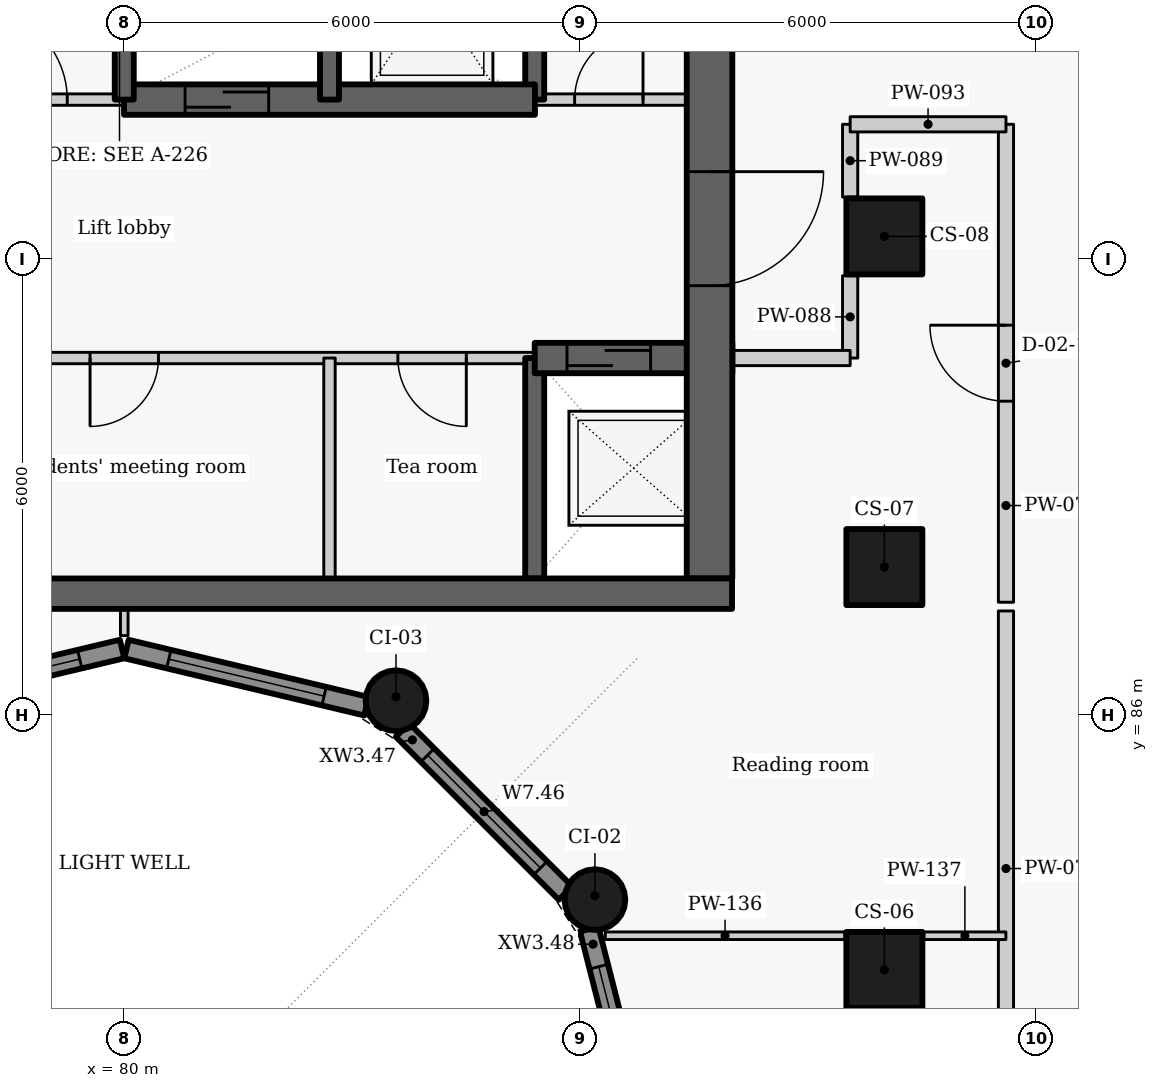
"""IFC4 building model, lengths in metres.
Left out: names, types, materials, properties, quantities, classifications, styles, units other than length and angle.
Written with IfcOpenShell. Run it as: python <this file> out.ifc"""

import sys

from ifc_helpers import new_model, si_unit, direction, frame, frame_2d, origin, origin_2d, place, context, subcontext, project, spatial, rectangle, circle, extrude, element, fill, save


model = new_model("IFC4")
c1 = context("Model", 3, precision=1e-05, world=origin(), true_north=direction((0.0, 1.0)))
c2 = subcontext(c1, "Body", "Model", "MODEL_VIEW")
j1 = project(units=[si_unit("LENGTHUNIT", "METRE"), si_unit("PLANEANGLEUNIT", "RADIAN")], contexts=[c1])
p1 = place(None, origin())
s1 = spatial("IfcSite", under=j1, at=p1, CompositionType="ELEMENT")
p2 = place(p1, origin())
s2 = spatial("IfcBuilding", under=s1, at=p2, CompositionType="ELEMENT")
p3 = place(p2, frame((0.0, 0.0, 140.4)))
s3 = spatial("IfcBuildingStorey", under=s2, at=p3, CompositionType="ELEMENT", Elevation=140.4)
for number, where, z_axis, x_axis in (
    (1, (90.0, 82.65, 0.0), (0.0, 0.0, 1.0), (0.0, 1.0, 0.0)),
    (2, (90.0, 87.95, 0.0), (0.0, 0.0, 1.0), (0.0, 1.0, 0.0)),
    (3, (90.0, 92.3, 0.0), (0.0, 0.0, 1.0), (0.0, 1.0, 0.0)),
):
    element("IfcColumn", number, at=place(p3, frame(where, z_axis=z_axis, x_axis=x_axis)), inside=s3, PredefinedType="COLUMN", context=c2, shape_type="SweptSolid", body=[
        extrude(rectangle(XDim=1.0, YDim=1.0, at=origin_2d()), origin(), (0.0, 0.0, 1.0), 3.3),
    ])
for number, where, z_axis, x_axis in (
    (4, (86.192, 83.575, 0.0), (0.0, 0.0, 1.0), (-0.5, 0.866, 0.0)),
    (5, (83.575, 86.192, 0.0), (0.0, 0.0, 1.0), (-0.866, 0.5, 0.0)),
):
    element("IfcColumn", number, at=place(p3, frame(where, z_axis=z_axis, x_axis=x_axis)), inside=s3, PredefinedType="COLUMN", context=c2, shape_type="SweptSolid", body=[
        extrude(circle(Radius=0.4, at=origin_2d()), origin(), (0.0, 0.0, 1.0), 3.3),
    ])
p4 = place(p3, frame((76.814, 86.119, 0.0), z_axis=(0.0, 0.0, 1.0), x_axis=(0.972773113459, 0.231759508395, 0.0)))
e6 = element("IfcWall", 6, at=p4, inside=s3, PredefinedType="SOLIDWALL", context=c2, shape_type="SweptSolid", body=[
    extrude(rectangle(XDim=3.246, YDim=0.25, at=frame_2d((1.623, 0.0))), origin(), (0.0, 0.0, 1.0), 2.425),
])
p5 = place(p4, frame((0.573, 0.0, 0.9)))
e7 = element("IfcOpeningElement", 7, at=p5, cuts=e6, PredefinedType="OPENING", context=c2, shape_type="SweptSolid", body=[
    extrude(rectangle(XDim=2.1, YDim=1.1, at=frame_2d((1.05, 0.55))), frame((0.0, 0.135, 0.0), z_axis=(0.0, -1.0, 0.0), x_axis=(1.0, 0.0, 0.0)), (0.0, 0.0, 1.0), 0.27),
])
p6 = place(p3, frame((80.029, 86.872, 0.0), z_axis=(0.0, 0.0, 1.0), x_axis=(0.972773113459, -0.231759508395, 0.0)))
e8 = element("IfcWall", 8, at=p6, inside=s3, PredefinedType="SOLIDWALL", context=c2, shape_type="SweptSolid", body=[
    extrude(rectangle(XDim=3.246, YDim=0.25, at=frame_2d((1.623, 0.0))), origin(), (0.0, 0.0, 1.0), 2.425),
])
p7 = place(p6, frame((0.573, 0.0, 0.9)))
e9 = element("IfcOpeningElement", 9, at=p7, cuts=e8, PredefinedType="OPENING", context=c2, shape_type="SweptSolid", body=[
    extrude(rectangle(XDim=2.1, YDim=1.1, at=frame_2d((1.05, 0.55))), frame((0.0, 0.135, 0.0), z_axis=(0.0, -1.0, 0.0), x_axis=(1.0, 0.0, 0.0)), (0.0, 0.0, 1.0), 0.27),
])
p8 = place(p3, frame((83.661, 85.806, 0.0), z_axis=(0.0, 0.0, 1.0), x_axis=(0.707106781187, -0.707106781187, 0.0)))
e10 = element("IfcWall", 10, at=p8, inside=s3, PredefinedType="SOLIDWALL", context=c2, shape_type="SweptSolid", body=[
    extrude(rectangle(XDim=3.033, YDim=0.25, at=frame_2d((1.517, 0.0))), origin(), (0.0, 0.0, 1.0), 2.425),
])
p9 = place(p8, frame((0.467, 0.0, 0.9)))
e11 = element("IfcOpeningElement", 11, at=p9, cuts=e10, PredefinedType="OPENING", context=c2, shape_type="SweptSolid", body=[
    extrude(rectangle(XDim=2.1, YDim=1.1, at=frame_2d((1.05, 0.55))), frame((0.0, 0.135, 0.0), z_axis=(0.0, -1.0, 0.0), x_axis=(1.0, 0.0, 0.0)), (0.0, 0.0, 1.0), 0.27),
])
p10 = place(p3, frame((86.117, 83.187, 0.0), z_axis=(0.0, 0.0, 1.0), x_axis=(0.247055971283, -0.969001211069, 0.0)))
e12 = element("IfcWall", 12, at=p10, inside=s3, PredefinedType="SOLIDWALL", context=c2, shape_type="SweptSolid", body=[
    extrude(rectangle(XDim=3.01, YDim=0.25, at=frame_2d((1.505, 0.0))), origin(), (0.0, 0.0, 1.0), 2.425),
])
p11 = place(p10, frame((0.51, 0.0, 0.9)))
e13 = element("IfcOpeningElement", 13, at=p11, cuts=e12, PredefinedType="OPENING", context=c2, shape_type="SweptSolid", body=[
    extrude(rectangle(XDim=2.1, YDim=1.1, at=frame_2d((1.05, 0.55))), frame((0.0, 0.135, 0.0), z_axis=(0.0, -1.0, 0.0), x_axis=(1.0, 0.0, 0.0)), (0.0, 0.0, 1.0), 0.27),
])
p12 = place(p3, frame((85.4, 90.7, 0.0), z_axis=(0.0, 0.0, 1.0), x_axis=(-1.0, 0.0, 0.0)))
e14 = element("IfcWall", 14, at=p12, inside=s3, PredefinedType="PARTITIONING", context=c2, shape_type="SweptSolid", body=[
    extrude(rectangle(XDim=13.4, YDim=0.15, at=frame_2d((6.7, 0.0))), origin(), (0.0, 0.0, 1.0), 3.025),
])
p13 = place(p12, frame((11.325, 0.0, 0.0)))
e15 = element("IfcOpeningElement", 15, at=p13, cuts=e14, PredefinedType="OPENING", context=c2, shape_type="SweptSolid", body=[
    extrude(rectangle(XDim=0.9, YDim=2.1, at=frame_2d((0.45, 1.05))), frame((0.0, 0.085, 0.0), z_axis=(0.0, -1.0, 0.0), x_axis=(1.0, 0.0, 0.0)), (0.0, 0.0, 1.0), 0.17),
])
p14 = place(p12, frame((9.0, 0.0, 0.0)))
e16 = element("IfcOpeningElement", 16, at=p14, cuts=e14, PredefinedType="OPENING", context=c2, shape_type="SweptSolid", body=[
    extrude(rectangle(XDim=0.9, YDim=2.1, at=frame_2d((0.45, 1.05))), frame((0.0, 0.085, 0.0), z_axis=(0.0, -1.0, 0.0), x_axis=(1.0, 0.0, 0.0)), (0.0, 0.0, 1.0), 0.17),
])
p15 = place(p12, frame((4.95, 0.0, 0.0)))
e17 = element("IfcOpeningElement", 17, at=p15, cuts=e14, PredefinedType="OPENING", context=c2, shape_type="SweptSolid", body=[
    extrude(rectangle(XDim=0.9, YDim=2.1, at=frame_2d((0.45, 1.05))), frame((0.0, 0.085, 0.0), z_axis=(0.0, -1.0, 0.0), x_axis=(1.0, 0.0, 0.0)), (0.0, 0.0, 1.0), 0.17),
])
p16 = place(p12, frame((0.9, 0.0, 0.0)))
e18 = element("IfcOpeningElement", 18, at=p16, cuts=e14, PredefinedType="OPENING", context=c2, shape_type="SweptSolid", body=[
    extrude(rectangle(XDim=0.9, YDim=2.1, at=frame_2d((0.45, 1.05))), frame((0.0, 0.085, 0.0), z_axis=(0.0, -1.0, 0.0), x_axis=(1.0, 0.0, 0.0)), (0.0, 0.0, 1.0), 0.17),
])
p17 = place(p3, frame((85.4, 87.8, -0.275), z_axis=(0.0, 0.0, 1.0), x_axis=(0.0, 1.0, 0.0)))
e19 = element("IfcWall", 19, at=p17, inside=s3, PredefinedType="SHEAR", context=c2, shape_type="SweptSolid", body=[
    extrude(rectangle(XDim=2.9, YDim=0.25, at=frame_2d((1.45, 0.0))), origin(), (0.0, 0.0, 1.0), 3.3),
])
p18 = place(p3, frame((85.4, 94.1, -0.275), z_axis=(0.0, 0.0, 1.0), x_axis=(0.0, 1.0, 0.0)))
e20 = element("IfcWall", 20, at=p18, inside=s3, PredefinedType="SHEAR", context=c2, shape_type="SweptSolid", body=[
    extrude(rectangle(XDim=2.8, YDim=0.25, at=frame_2d((1.4, 0.0))), origin(), (0.0, 0.0, 1.0), 3.3),
])
p19 = place(p3, frame((85.4, 90.7, -0.275), z_axis=(0.0, 0.0, 1.0), x_axis=(1.0, 0.0, 0.0)))
e21 = element("IfcWall", 21, at=p19, inside=s3, PredefinedType="SHEAR", context=c2, shape_type="SweptSolid", body=[
    extrude(rectangle(XDim=2.6, YDim=0.4, at=frame_2d((1.3, 0.0))), origin(), (0.0, 0.0, 1.0), 3.3),
])
p20 = place(p19, frame((0.425, 0.0, 0.275)))
e22 = element("IfcOpeningElement", 22, at=p20, cuts=e21, PredefinedType="OPENING", context=c2, shape_type="SweptSolid", body=[
    extrude(rectangle(XDim=1.1, YDim=2.1, at=frame_2d((0.55, 1.05))), frame((0.0, 0.21, 0.0), z_axis=(0.0, -1.0, 0.0), x_axis=(1.0, 0.0, 0.0)), (0.0, 0.0, 1.0), 0.42),
])
p21 = place(p3, frame((87.7, 103.4, -0.275), z_axis=(0.0, 0.0, 1.0), x_axis=(0.0, -1.0, 0.0)))
e23 = element("IfcWall", 23, at=p21, inside=s3, PredefinedType="SHEAR", context=c2, shape_type="SweptSolid", body=[
    extrude(rectangle(XDim=15.6, YDim=0.6, at=frame_2d((7.8, 0.0))), origin(), (0.0, 0.0, 1.0), 3.3),
])
p22 = place(p21, frame((10.248, 0.0, 0.275)))
e24 = element("IfcOpeningElement", 24, at=p22, cuts=e23, PredefinedType="OPENING", context=c2, shape_type="SweptSolid", body=[
    extrude(rectangle(XDim=1.5, YDim=2.1, at=frame_2d((0.75, 1.05))), frame((0.0, 0.31, 0.0), z_axis=(0.0, -1.0, 0.0), x_axis=(1.0, 0.0, 0.0)), (0.0, 0.0, 1.0), 0.62),
])
p23 = place(p3, frame((82.7, 87.8, 0.0), z_axis=(0.0, 0.0, 1.0), x_axis=(0.0, 1.0, 0.0)))
e25 = element("IfcWall", 25, at=p23, inside=s3, PredefinedType="PARTITIONING", context=c2, shape_type="SweptSolid", body=[
    extrude(rectangle(XDim=2.9, YDim=0.15, at=frame_2d((1.45, 0.0))), origin(), (0.0, 0.0, 1.0), 3.025),
])
p24 = place(p3, frame((77.297, 94.1, 0.0), z_axis=(0.0, 0.0, 1.0), x_axis=(1.0, 0.0, 0.0)))
e26 = element("IfcWall", 26, at=p24, inside=s3, PredefinedType="PARTITIONING", context=c2, shape_type="SweptSolid", body=[
    extrude(rectangle(XDim=2.706, YDim=0.15, at=frame_2d((1.353, 0.0))), origin(), (0.0, 0.0, 1.0), 3.025),
])
p25 = place(p24, frame((0.753, 0.0, 0.0)))
e27 = element("IfcOpeningElement", 27, at=p25, cuts=e26, PredefinedType="OPENING", context=c2, shape_type="SweptSolid", body=[
    extrude(rectangle(XDim=1.2, YDim=2.1, at=frame_2d((0.6, 1.05))), frame((0.0, 0.085, 0.0), z_axis=(0.0, -1.0, 0.0), x_axis=(1.0, 0.0, 0.0)), (0.0, 0.0, 1.0), 0.17),
])
p26 = place(p3, frame((85.397, 94.1, 0.0), z_axis=(0.0, 0.0, 1.0), x_axis=(1.0, 0.0, 0.0)))
e28 = element("IfcWall", 28, at=p26, inside=s3, PredefinedType="PARTITIONING", context=c2, shape_type="SweptSolid", body=[
    extrude(rectangle(XDim=2.603, YDim=0.15, at=frame_2d((1.302, 0.0))), origin(), (0.0, 0.0, 1.0), 3.025),
])
p27 = place(p26, frame((0.528, 0.0, 0.0)))
e29 = element("IfcOpeningElement", 29, at=p27, cuts=e28, PredefinedType="OPENING", context=c2, shape_type="SweptSolid", body=[
    extrude(rectangle(XDim=0.9, YDim=2.1, at=frame_2d((0.45, 1.05))), frame((0.0, 0.085, 0.0), z_axis=(0.0, -1.0, 0.0), x_axis=(1.0, 0.0, 0.0)), (0.0, 0.0, 1.0), 0.17),
])
p28 = place(p3, frame((79.997, 94.1, -0.275), z_axis=(0.0, 0.0, 1.0), x_axis=(1.0, 0.0, 0.0)))
e30 = element("IfcWall", 30, at=p28, inside=s3, PredefinedType="SHEAR", context=c2, shape_type="SweptSolid", body=[
    extrude(rectangle(XDim=5.406, YDim=0.4, at=frame_2d((2.703, 0.0))), origin(), (0.0, 0.0, 1.0), 3.3),
])
p29 = place(p28, frame((0.803, 0.0, 0.275)))
e31 = element("IfcOpeningElement", 31, at=p29, cuts=e30, PredefinedType="OPENING", context=c2, shape_type="SweptSolid", body=[
    extrude(rectangle(XDim=1.1, YDim=2.1, at=frame_2d((0.55, 1.05))), frame((0.0, 0.21, 0.0), z_axis=(0.0, -1.0, 0.0), x_axis=(1.0, 0.0, 0.0)), (0.0, 0.0, 1.0), 0.42),
])
for number, where, z_axis, x_axis in (
    (32, (80.0, 94.1, -0.275), (0.0, 0.0, 1.0), (0.0, 1.0, 0.0)),
    (33, (82.7, 94.1, -0.275), (0.0, 0.0, 1.0), (0.0, 1.0, 0.0)),
):
    element("IfcWall", number, at=place(p3, frame(where, z_axis=z_axis, x_axis=x_axis)), inside=s3, PredefinedType="SHEAR", context=c2, shape_type="SweptSolid", body=[
        extrude(rectangle(XDim=2.8, YDim=0.25, at=frame_2d((1.4, 0.0))), origin(), (0.0, 0.0, 1.0), 3.3),
    ])
p30 = place(p3, frame((91.6, 76.887, 0.0), z_axis=(0.0, 0.0, 1.0), x_axis=(0.0, 1.0, 0.0)))
e34 = element("IfcWall", 34, at=p30, inside=s3, PredefinedType="PARTITIONING", context=c2, shape_type="SweptSolid", body=[
    extrude(rectangle(XDim=10.486, YDim=0.2, at=frame_2d((5.243, 0.0))), origin(), (0.0, 0.0, 1.0), 3.025),
])
p31 = place(p30, frame((2.608, 0.0, 0.0)))
e35 = element("IfcOpeningElement", 35, at=p31, cuts=e34, PredefinedType="OPENING", context=c2, shape_type="SweptSolid", body=[
    extrude(rectangle(XDim=1.0, YDim=2.1, at=frame_2d((0.5, 1.05))), frame((0.0, 0.11, 0.0), z_axis=(0.0, -1.0, 0.0), x_axis=(1.0, 0.0, 0.0)), (0.0, 0.0, 1.0), 0.22),
])
p32 = place(p3, frame((91.6, 87.487, 0.0), z_axis=(0.0, 0.0, 1.0), x_axis=(0.0, 1.0, 0.0)))
e36 = element("IfcWall", 36, at=p32, inside=s3, PredefinedType="PARTITIONING", context=c2, shape_type="SweptSolid", body=[
    extrude(rectangle(XDim=6.288, YDim=0.2, at=frame_2d((3.144, 0.0))), origin(), (0.0, 0.0, 1.0), 3.025),
])
p33 = place(p32, frame((2.645, 0.0, 0.0)))
e37 = element("IfcOpeningElement", 37, at=p33, cuts=e36, PredefinedType="OPENING", context=c2, shape_type="SweptSolid", body=[
    extrude(rectangle(XDim=1.0, YDim=2.1, at=frame_2d((0.5, 1.05))), frame((0.0, 0.11, 0.0), z_axis=(0.0, -1.0, 0.0), x_axis=(1.0, 0.0, 0.0)), (0.0, 0.0, 1.0), 0.22),
])
p34 = place(p3, frame((89.55, 90.7, 0.0), z_axis=(0.0, 0.0, 1.0), x_axis=(0.0, 1.0, 0.0)))
e38 = element("IfcWall", 38, at=p34, inside=s3, PredefinedType="PARTITIONING", context=c2, shape_type="SweptSolid", body=[
    extrude(rectangle(XDim=1.083, YDim=0.2, at=frame_2d((0.542, 0.0))), origin(), (0.0, 0.0, 1.0), 3.025),
])
p35 = place(p3, frame((89.55, 92.817, 0.0), z_axis=(0.0, 0.0, 1.0), x_axis=(0.0, 1.0, 0.0)))
e39 = element("IfcWall", 39, at=p35, inside=s3, PredefinedType="PARTITIONING", context=c2, shape_type="SweptSolid", body=[
    extrude(rectangle(XDim=0.958, YDim=0.2, at=frame_2d((0.479, 0.0))), origin(), (0.0, 0.0, 1.0), 3.025),
])
p36 = place(p3, frame((89.55, 93.775, 0.0), z_axis=(0.0, 0.0, 1.0), x_axis=(1.0, 0.0, 0.0)))
e40 = element("IfcWall", 40, at=p36, inside=s3, PredefinedType="PARTITIONING", context=c2, shape_type="SweptSolid", body=[
    extrude(rectangle(XDim=2.05, YDim=0.2, at=frame_2d((1.025, 0.0))), origin(), (0.0, 0.0, 1.0), 2.505),
])
p37 = place(p3, frame((88.0, 90.7, 0.0), z_axis=(0.0, 0.0, 1.0), x_axis=(1.0, 0.0, 0.0)))
e41 = element("IfcWall", 41, at=p37, inside=s3, PredefinedType="PARTITIONING", context=c2, shape_type="SweptSolid", body=[
    extrude(rectangle(XDim=1.55, YDim=0.2, at=frame_2d((0.775, 0.0))), origin(), (0.0, 0.0, 1.0), 3.025),
])
p38 = place(p3, frame((80.0, 87.048, 0.0), z_axis=(0.0, 0.0, 1.0), x_axis=(0.0, 1.0, 0.0)))
e42 = element("IfcWall", 42, at=p38, inside=s3, PredefinedType="PARTITIONING", context=c2, shape_type="SweptSolid", body=[
    extrude(rectangle(XDim=0.352, YDim=0.1, at=frame_2d((0.176, 0.0))), origin(), (0.0, 0.0, 1.0), 3.025),
])
p39 = place(p3, frame((86.328, 83.1, 0.0), z_axis=(0.0, 0.0, 1.0), x_axis=(1.0, 0.0, 0.0)))
e43 = element("IfcWall", 43, at=p39, inside=s3, PredefinedType="PARTITIONING", context=c2, shape_type="SweptSolid", body=[
    extrude(rectangle(XDim=3.152, YDim=0.1, at=frame_2d((1.576, 0.0))), origin(), (0.0, 0.0, 1.0), 3.025),
])
p40 = place(p3, frame((90.52, 83.1, 0.0), z_axis=(0.0, 0.0, 1.0), x_axis=(1.0, 0.0, 0.0)))
e44 = element("IfcWall", 44, at=p40, inside=s3, PredefinedType="PARTITIONING", context=c2, shape_type="SweptSolid", body=[
    extrude(rectangle(XDim=1.079, YDim=0.1, at=frame_2d((0.54, 0.0))), origin(), (0.0, 0.0, 1.0), 3.025),
])
p41 = place(p3, frame((72.004, 87.6, -0.275), z_axis=(0.0, 0.0, 1.0), x_axis=(1.0, 0.0, 0.0)))
e45 = element("IfcWall", 45, at=p41, inside=s3, PredefinedType="SHEAR", context=c2, shape_type="SweptSolid", body=[
    extrude(rectangle(XDim=15.992, YDim=0.4, at=frame_2d((7.996, 0.0))), origin(), (0.0, 0.0, 1.0), 3.3),
])
p42 = place(p5, origin())
e46 = element("IfcWindow", 46, at=p42, inside=s3, PartitioningType="SINGLE_PANEL", PredefinedType="WINDOW", context=c2, shape_type="SweptSolid", body=[
    extrude(rectangle(XDim=2.1, YDim=1.1, at=frame_2d((1.05, 0.55))), frame((0.0, 0.03, 0.0), z_axis=(0.0, -1.0, 0.0), x_axis=(1.0, 0.0, 0.0)), (0.0, 0.0, 1.0), 0.06),
])
fill(e7, e46)
p43 = place(p7, origin())
e47 = element("IfcWindow", 47, at=p43, inside=s3, PartitioningType="SINGLE_PANEL", PredefinedType="WINDOW", context=c2, shape_type="SweptSolid", body=[
    extrude(rectangle(XDim=2.1, YDim=1.1, at=frame_2d((1.05, 0.55))), frame((0.0, 0.03, 0.0), z_axis=(0.0, -1.0, 0.0), x_axis=(1.0, 0.0, 0.0)), (0.0, 0.0, 1.0), 0.06),
])
fill(e9, e47)
p44 = place(p9, origin())
e48 = element("IfcWindow", 48, at=p44, inside=s3, PartitioningType="SINGLE_PANEL", PredefinedType="WINDOW", context=c2, shape_type="SweptSolid", body=[
    extrude(rectangle(XDim=2.1, YDim=1.1, at=frame_2d((1.05, 0.55))), frame((0.0, 0.03, 0.0), z_axis=(0.0, -1.0, 0.0), x_axis=(1.0, 0.0, 0.0)), (0.0, 0.0, 1.0), 0.06),
])
fill(e11, e48)
p45 = place(p11, origin())
e49 = element("IfcWindow", 49, at=p45, inside=s3, PartitioningType="SINGLE_PANEL", PredefinedType="WINDOW", context=c2, shape_type="SweptSolid", body=[
    extrude(rectangle(XDim=2.1, YDim=1.1, at=frame_2d((1.05, 0.55))), frame((0.0, 0.03, 0.0), z_axis=(0.0, -1.0, 0.0), x_axis=(1.0, 0.0, 0.0)), (0.0, 0.0, 1.0), 0.06),
])
fill(e13, e49)
p46 = place(p20, origin())
e50 = element("IfcDoor", 50, at=p46, inside=s3, OperationType="SLIDING_TO_LEFT", PredefinedType="DOOR", context=c2, shape_type="SweptSolid", body=[
    extrude(rectangle(XDim=1.1, YDim=2.1, at=frame_2d((0.55, 1.05))), frame((0.0, 0.025, 0.0), z_axis=(0.0, -1.0, 0.0), x_axis=(1.0, 0.0, 0.0)), (0.0, 0.0, 1.0), 0.05),
])
fill(e22, e50)
p47 = place(p15, origin())
e51 = element("IfcDoor", 51, at=p47, inside=s3, OperationType="SINGLE_SWING_RIGHT", PredefinedType="DOOR", context=c2, shape_type="SweptSolid", body=[
    extrude(rectangle(XDim=0.9, YDim=2.1, at=frame_2d((0.45, 1.05))), frame((0.0, 0.025, 0.0), z_axis=(0.0, -1.0, 0.0), x_axis=(1.0, 0.0, 0.0)), (0.0, 0.0, 1.0), 0.05),
])
fill(e17, e51)
p48 = place(p16, origin())
e52 = element("IfcDoor", 52, at=p48, inside=s3, OperationType="SINGLE_SWING_LEFT", PredefinedType="DOOR", context=c2, shape_type="SweptSolid", body=[
    extrude(rectangle(XDim=0.9, YDim=2.1, at=frame_2d((0.45, 1.05))), frame((0.0, 0.025, 0.0), z_axis=(0.0, -1.0, 0.0), x_axis=(1.0, 0.0, 0.0)), (0.0, 0.0, 1.0), 0.05),
])
fill(e18, e52)
p49 = place(p25, origin())
e53 = element("IfcDoor", 53, at=p49, inside=s3, OperationType="DOUBLE_DOOR_SINGLE_SWING", PredefinedType="DOOR", context=c2, shape_type="SweptSolid", body=[
    extrude(rectangle(XDim=1.2, YDim=2.1, at=frame_2d((0.6, 1.05))), frame((0.0, 0.025, 0.0), z_axis=(0.0, -1.0, 0.0), x_axis=(1.0, 0.0, 0.0)), (0.0, 0.0, 1.0), 0.05),
])
fill(e27, e53)
p50 = place(p29, origin())
e54 = element("IfcDoor", 54, at=p50, inside=s3, OperationType="SLIDING_TO_LEFT", PredefinedType="DOOR", context=c2, shape_type="SweptSolid", body=[
    extrude(rectangle(XDim=1.1, YDim=2.1, at=frame_2d((0.55, 1.05))), frame((0.0, 0.025, 0.0), z_axis=(0.0, -1.0, 0.0), x_axis=(1.0, 0.0, 0.0)), (0.0, 0.0, 1.0), 0.05),
])
fill(e31, e54)
p51 = place(p27, origin())
e55 = element("IfcDoor", 55, at=p51, inside=s3, OperationType="SINGLE_SWING_RIGHT", PredefinedType="DOOR", context=c2, shape_type="SweptSolid", body=[
    extrude(rectangle(XDim=0.9, YDim=2.1, at=frame_2d((0.45, 1.05))), frame((0.0, 0.025, 0.0), z_axis=(0.0, -1.0, 0.0), x_axis=(1.0, 0.0, 0.0)), (0.0, 0.0, 1.0), 0.05),
])
fill(e29, e55)
p52 = place(p33, origin())
e56 = element("IfcDoor", 56, at=p52, inside=s3, OperationType="SINGLE_SWING_RIGHT", PredefinedType="DOOR", context=c2, shape_type="SweptSolid", body=[
    extrude(rectangle(XDim=1.0, YDim=2.1, at=frame_2d((0.5, 1.05))), frame((0.0, 0.025, 0.0), z_axis=(0.0, -1.0, 0.0), x_axis=(1.0, 0.0, 0.0)), (0.0, 0.0, 1.0), 0.05),
])
fill(e37, e56)
p53 = place(p22, origin())
e57 = element("IfcDoor", 57, at=p53, inside=s3, OperationType="DOUBLE_DOOR_SINGLE_SWING", PredefinedType="DOOR", context=c2, shape_type="SweptSolid", body=[
    extrude(rectangle(XDim=1.5, YDim=2.1, at=frame_2d((0.75, 1.05))), frame((0.0, 0.025, 0.0), z_axis=(0.0, -1.0, 0.0), x_axis=(1.0, 0.0, 0.0)), (0.0, 0.0, 1.0), 0.05),
])
fill(e24, e57)
save(model, sys.argv[1])
